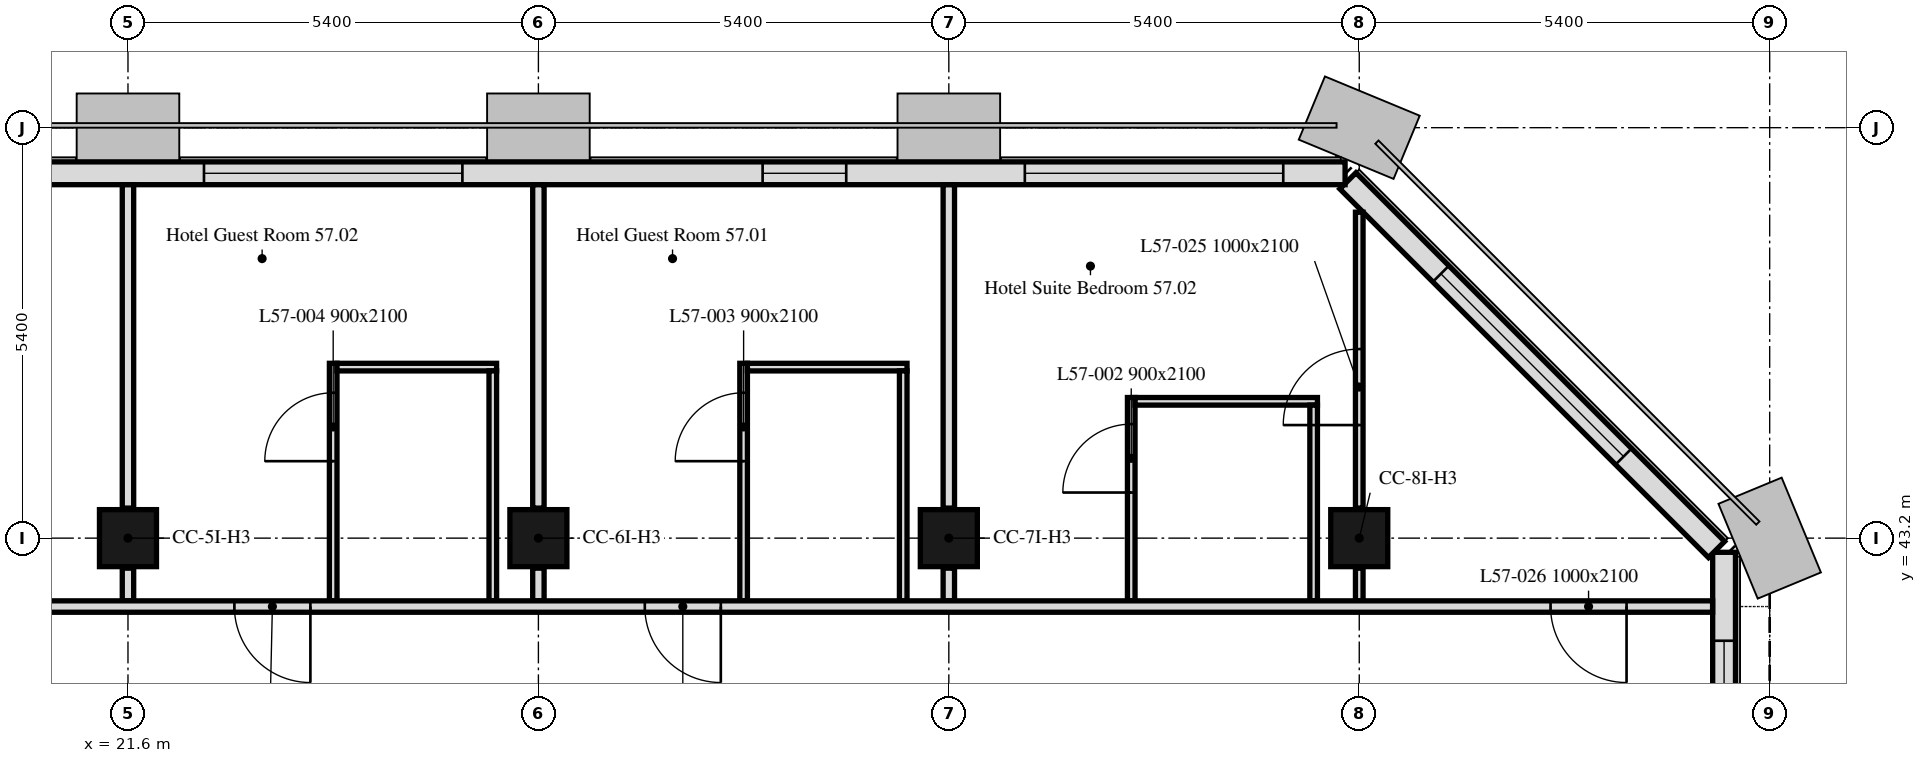
"""IFC4 building model, lengths in metres.
Left out: names, types, materials, properties, quantities, classifications, styles, units other than length and angle.
Written with IfcOpenShell. Run it as: python <this file> out.ifc"""

import sys

from ifc_helpers import new_model, si_unit, direction, frame, frame_2d, origin, origin_2d, place, context, subcontext, project, spatial, rectangle, extrude, element, fill, save


model = new_model("IFC4")
c1 = context("Model", 3, precision=1e-05, world=origin(), true_north=direction((0.0, 1.0)))
c2 = subcontext(c1, "Body", "Model", "MODEL_VIEW")
j1 = project(units=[si_unit("LENGTHUNIT", "METRE"), si_unit("PLANEANGLEUNIT", "RADIAN")], contexts=[c1])
p1 = place(None, origin())
s1 = spatial("IfcSite", under=j1, at=p1, CompositionType="ELEMENT")
p2 = place(p1, origin())
s2 = spatial("IfcBuilding", under=s1, at=p2, CompositionType="ELEMENT")
p3 = place(p2, frame((0.0, 0.0, 226.9)))
s3 = spatial("IfcBuildingStorey", under=s2, at=p3, CompositionType="ELEMENT", Elevation=226.9)
for number, where, z_axis, x_axis in (
    (1, (21.6, 43.2, 0.0), (0.0, 0.0, 1.0), (1.0, 0.0, 0.0)),
    (2, (27.0, 43.2, 0.0), (0.0, 0.0, 1.0), (1.0, 0.0, 0.0)),
    (3, (32.4, 43.2, 0.0), (0.0, 0.0, 1.0), (1.0, 0.0, 0.0)),
    (4, (37.8, 43.2, 0.0), (0.0, 0.0, 1.0), (1.0, 0.0, 0.0)),
):
    element("IfcColumn", number, at=place(p3, frame(where, z_axis=z_axis, x_axis=x_axis)), inside=s3, PredefinedType="COLUMN", context=c2, shape_type="SweptSolid", body=[
        extrude(rectangle(XDim=0.75, YDim=0.75, at=origin_2d()), origin(), (0.0, 0.0, 1.0), 3.0),
    ])
p4 = place(p3, frame((42.6, 32.4, 0.0), z_axis=(0.0, 0.0, 1.0), x_axis=(0.0, 1.0, 0.0)))
e5 = element("IfcWall", 5, at=p4, inside=s3, PredefinedType="SOLIDWALL", context=c2, shape_type="SweptSolid", body=[
    extrude(rectangle(XDim=10.614, YDim=0.3, at=frame_2d((5.307, 0.0))), origin(), (0.0, 0.0, 1.0), 3.0),
])
p5 = place(p4, frame((1.0, 0.0, 0.9)))
e6 = element("IfcOpeningElement", 6, at=p5, cuts=e5, PredefinedType="OPENING", context=c2, shape_type="SweptSolid", body=[
    extrude(rectangle(XDim=3.4, YDim=1.7, at=frame_2d((1.7, 0.85))), frame((0.0, 0.16, 0.0), z_axis=(0.0, -1.0, 0.0), x_axis=(1.0, 0.0, 0.0)), (0.0, 0.0, 1.0), 0.32),
])
p6 = place(p4, frame((6.75, 0.0, 0.9)))
e7 = element("IfcOpeningElement", 7, at=p6, cuts=e5, PredefinedType="OPENING", context=c2, shape_type="SweptSolid", body=[
    extrude(rectangle(XDim=1.1, YDim=1.7, at=frame_2d((0.55, 0.85))), frame((0.0, 0.16, 0.0), z_axis=(0.0, -1.0, 0.0), x_axis=(1.0, 0.0, 0.0)), (0.0, 0.0, 1.0), 0.32),
])
p7 = place(p4, frame((8.35, 0.0, 0.9)))
e8 = element("IfcOpeningElement", 8, at=p7, cuts=e5, PredefinedType="OPENING", context=c2, shape_type="SweptSolid", body=[
    extrude(rectangle(XDim=1.1, YDim=1.7, at=frame_2d((0.55, 0.85))), frame((0.0, 0.16, 0.0), z_axis=(0.0, -1.0, 0.0), x_axis=(1.0, 0.0, 0.0)), (0.0, 0.0, 1.0), 0.32),
])
p8 = place(p3, frame((42.501, 43.051, 0.0), z_axis=(0.0, 0.0, 1.0), x_axis=(-0.707106781187, 0.707106781187, 0.0)))
e9 = element("IfcWall", 9, at=p8, inside=s3, PredefinedType="SOLIDWALL", context=c2, shape_type="SweptSolid", body=[
    extrude(rectangle(XDim=6.86, YDim=0.3, at=frame_2d((3.43, 0.0))), origin(), (0.0, 0.0, 1.0), 3.0),
])
p9 = place(p8, frame((1.73, 0.0, 0.9)))
e10 = element("IfcOpeningElement", 10, at=p9, cuts=e9, PredefinedType="OPENING", context=c2, shape_type="SweptSolid", body=[
    extrude(rectangle(XDim=3.4, YDim=1.7, at=frame_2d((1.7, 0.85))), frame((0.0, 0.16, 0.0), z_axis=(0.0, -1.0, 0.0), x_axis=(1.0, 0.0, 0.0)), (0.0, 0.0, 1.0), 0.32),
])
p10 = place(p3, frame((37.614, 48.0, 0.0), z_axis=(0.0, 0.0, 1.0), x_axis=(-1.0, 0.0, 0.0)))
e11 = element("IfcWall", 11, at=p10, inside=s3, PredefinedType="SOLIDWALL", context=c2, shape_type="SweptSolid", body=[
    extrude(rectangle(XDim=32.027, YDim=0.3, at=frame_2d((16.014, 0.0))), origin(), (0.0, 0.0, 1.0), 3.0),
])
p11 = place(p10, frame((0.814, 0.0, 0.9)))
e12 = element("IfcOpeningElement", 12, at=p11, cuts=e11, PredefinedType="OPENING", context=c2, shape_type="SweptSolid", body=[
    extrude(rectangle(XDim=3.4, YDim=1.7, at=frame_2d((1.7, 0.85))), frame((0.0, 0.16, 0.0), z_axis=(0.0, -1.0, 0.0), x_axis=(1.0, 0.0, 0.0)), (0.0, 0.0, 1.0), 0.32),
])
p12 = place(p10, frame((6.564, 0.0, 0.9)))
e13 = element("IfcOpeningElement", 13, at=p12, cuts=e11, PredefinedType="OPENING", context=c2, shape_type="SweptSolid", body=[
    extrude(rectangle(XDim=1.1, YDim=1.7, at=frame_2d((0.55, 0.85))), frame((0.0, 0.16, 0.0), z_axis=(0.0, -1.0, 0.0), x_axis=(1.0, 0.0, 0.0)), (0.0, 0.0, 1.0), 0.32),
])
p13 = place(p10, frame((11.614, 0.0, 0.9)))
e14 = element("IfcOpeningElement", 14, at=p13, cuts=e11, PredefinedType="OPENING", context=c2, shape_type="SweptSolid", body=[
    extrude(rectangle(XDim=3.4, YDim=1.7, at=frame_2d((1.7, 0.85))), frame((0.0, 0.16, 0.0), z_axis=(0.0, -1.0, 0.0), x_axis=(1.0, 0.0, 0.0)), (0.0, 0.0, 1.0), 0.32),
])
p14 = place(p10, frame((17.364, 0.0, 0.9)))
e15 = element("IfcOpeningElement", 15, at=p14, cuts=e11, PredefinedType="OPENING", context=c2, shape_type="SweptSolid", body=[
    extrude(rectangle(XDim=1.1, YDim=1.7, at=frame_2d((0.55, 0.85))), frame((0.0, 0.16, 0.0), z_axis=(0.0, -1.0, 0.0), x_axis=(1.0, 0.0, 0.0)), (0.0, 0.0, 1.0), 0.32),
])
p15 = place(p10, frame((22.414, 0.0, 0.9)))
e16 = element("IfcOpeningElement", 16, at=p15, cuts=e11, PredefinedType="OPENING", context=c2, shape_type="SweptSolid", body=[
    extrude(rectangle(XDim=3.4, YDim=1.7, at=frame_2d((1.7, 0.85))), frame((0.0, 0.16, 0.0), z_axis=(0.0, -1.0, 0.0), x_axis=(1.0, 0.0, 0.0)), (0.0, 0.0, 1.0), 0.32),
])
p16 = place(p10, frame((28.164, 0.0, 0.9)))
e17 = element("IfcOpeningElement", 17, at=p16, cuts=e11, PredefinedType="OPENING", context=c2, shape_type="SweptSolid", body=[
    extrude(rectangle(XDim=1.1, YDim=1.7, at=frame_2d((0.55, 0.85))), frame((0.0, 0.16, 0.0), z_axis=(0.0, -1.0, 0.0), x_axis=(1.0, 0.0, 0.0)), (0.0, 0.0, 1.0), 0.32),
])
p17 = place(p3, frame((32.4, 47.849, 0.0), z_axis=(0.0, 0.0, 1.0), x_axis=(0.0, -1.0, 0.0)))
e18 = element("IfcWall", 18, at=p17, inside=s3, PredefinedType="PARTITIONING", context=c2, shape_type="SweptSolid", body=[
    extrude(rectangle(XDim=4.254, YDim=0.15, at=frame_2d((2.127, 0.0))), origin(), (0.0, 0.0, 1.0), 2.4),
])
p18 = place(p3, frame((32.4, 42.805, 0.0), z_axis=(0.0, 0.0, 1.0), x_axis=(0.0, -1.0, 0.0)))
e19 = element("IfcWall", 19, at=p18, inside=s3, PredefinedType="PARTITIONING", context=c2, shape_type="SweptSolid", body=[
    extrude(rectangle(XDim=0.43, YDim=0.15, at=frame_2d((0.215, 0.0))), origin(), (0.0, 0.0, 1.0), 2.4),
])
p19 = place(p3, frame((34.8, 42.375, 0.0), z_axis=(0.0, 0.0, 1.0), x_axis=(0.0, 1.0, 0.0)))
e20 = element("IfcWall", 20, at=p19, inside=s3, PredefinedType="PARTITIONING", context=c2, shape_type="SweptSolid", body=[
    extrude(rectangle(XDim=2.675, YDim=0.1, at=frame_2d((1.337, 0.0))), origin(), (0.0, 0.0, 1.0), 3.0),
])
p20 = place(p19, frame((1.425, 0.0, 0.0)))
e21 = element("IfcOpeningElement", 21, at=p20, cuts=e20, PredefinedType="OPENING", context=c2, shape_type="SweptSolid", body=[
    extrude(rectangle(XDim=0.9, YDim=2.1, at=frame_2d((0.45, 1.05))), frame((0.0, 0.05, 0.0), z_axis=(0.0, -1.0, 0.0), x_axis=(1.0, 0.0, 0.0)), (0.0, 0.0, 1.0), 0.1),
])
p21 = place(p3, frame((34.85, 45.0, 0.0), z_axis=(0.0, 0.0, 1.0), x_axis=(1.0, 0.0, 0.0)))
e22 = element("IfcWall", 22, at=p21, inside=s3, PredefinedType="PARTITIONING", context=c2, shape_type="SweptSolid", body=[
    extrude(rectangle(XDim=2.4, YDim=0.1, at=frame_2d((1.2, 0.0))), origin(), (0.0, 0.0, 1.0), 3.0),
])
p22 = place(p3, frame((37.2, 44.95, 0.0), z_axis=(0.0, 0.0, 1.0), x_axis=(0.0, -1.0, 0.0)))
e23 = element("IfcWall", 23, at=p22, inside=s3, PredefinedType="PARTITIONING", context=c2, shape_type="SweptSolid", body=[
    extrude(rectangle(XDim=2.575, YDim=0.1, at=frame_2d((1.288, 0.0))), origin(), (0.0, 0.0, 1.0), 3.0),
])
p23 = place(p3, frame((37.8, 42.375, 0.0), z_axis=(0.0, 0.0, 1.0), x_axis=(0.0, 1.0, 0.0)))
e24 = element("IfcWall", 24, at=p23, inside=s3, PredefinedType="PARTITIONING", context=c2, shape_type="SweptSolid", body=[
    extrude(rectangle(XDim=0.43, YDim=0.1, at=frame_2d((0.215, 0.0))), origin(), (0.0, 0.0, 1.0), 3.0),
])
p24 = place(p3, frame((37.8, 43.595, 0.0), z_axis=(0.0, 0.0, 1.0), x_axis=(0.0, 1.0, 0.0)))
e25 = element("IfcWall", 25, at=p24, inside=s3, PredefinedType="PARTITIONING", context=c2, shape_type="SweptSolid", body=[
    extrude(rectangle(XDim=3.893, YDim=0.1, at=frame_2d((1.946, 0.0))), origin(), (0.0, 0.0, 1.0), 3.0),
])
p25 = place(p24, frame((1.093, 0.0, 0.0)))
e26 = element("IfcOpeningElement", 26, at=p25, cuts=e25, PredefinedType="OPENING", context=c2, shape_type="SweptSolid", body=[
    extrude(rectangle(XDim=1.0, YDim=2.1, at=frame_2d((0.5, 1.05))), frame((0.0, 0.05, 0.0), z_axis=(0.0, -1.0, 0.0), x_axis=(1.0, 0.0, 0.0)), (0.0, 0.0, 1.0), 0.1),
])
p26 = place(p3, frame((27.0, 47.849, 0.0), z_axis=(0.0, 0.0, 1.0), x_axis=(0.0, -1.0, 0.0)))
e27 = element("IfcWall", 27, at=p26, inside=s3, PredefinedType="PARTITIONING", context=c2, shape_type="SweptSolid", body=[
    extrude(rectangle(XDim=4.254, YDim=0.15, at=frame_2d((2.127, 0.0))), origin(), (0.0, 0.0, 1.0), 2.4),
])
p27 = place(p3, frame((27.0, 42.805, 0.0), z_axis=(0.0, 0.0, 1.0), x_axis=(0.0, -1.0, 0.0)))
e28 = element("IfcWall", 28, at=p27, inside=s3, PredefinedType="PARTITIONING", context=c2, shape_type="SweptSolid", body=[
    extrude(rectangle(XDim=0.43, YDim=0.15, at=frame_2d((0.215, 0.0))), origin(), (0.0, 0.0, 1.0), 2.4),
])
p28 = place(p3, frame((29.7, 42.375, 0.0), z_axis=(0.0, 0.0, 1.0), x_axis=(0.0, 1.0, 0.0)))
e29 = element("IfcWall", 29, at=p28, inside=s3, PredefinedType="PARTITIONING", context=c2, shape_type="SweptSolid", body=[
    extrude(rectangle(XDim=3.125, YDim=0.1, at=frame_2d((1.562, 0.0))), origin(), (0.0, 0.0, 1.0), 3.0),
])
p29 = place(p28, frame((1.837, 0.0, 0.0)))
e30 = element("IfcOpeningElement", 30, at=p29, cuts=e29, PredefinedType="OPENING", context=c2, shape_type="SweptSolid", body=[
    extrude(rectangle(XDim=0.9, YDim=2.1, at=frame_2d((0.45, 1.05))), frame((0.0, 0.05, 0.0), z_axis=(0.0, -1.0, 0.0), x_axis=(1.0, 0.0, 0.0)), (0.0, 0.0, 1.0), 0.1),
])
p30 = place(p3, frame((29.75, 45.45, 0.0), z_axis=(0.0, 0.0, 1.0), x_axis=(1.0, 0.0, 0.0)))
e31 = element("IfcWall", 31, at=p30, inside=s3, PredefinedType="PARTITIONING", context=c2, shape_type="SweptSolid", body=[
    extrude(rectangle(XDim=2.1, YDim=0.1, at=frame_2d((1.05, 0.0))), origin(), (0.0, 0.0, 1.0), 3.0),
])
p31 = place(p3, frame((31.8, 45.4, 0.0), z_axis=(0.0, 0.0, 1.0), x_axis=(0.0, -1.0, 0.0)))
e32 = element("IfcWall", 32, at=p31, inside=s3, PredefinedType="PARTITIONING", context=c2, shape_type="SweptSolid", body=[
    extrude(rectangle(XDim=3.025, YDim=0.1, at=frame_2d((1.512, 0.0))), origin(), (0.0, 0.0, 1.0), 3.0),
])
p32 = place(p3, frame((21.6, 47.849, 0.0), z_axis=(0.0, 0.0, 1.0), x_axis=(0.0, -1.0, 0.0)))
e33 = element("IfcWall", 33, at=p32, inside=s3, PredefinedType="PARTITIONING", context=c2, shape_type="SweptSolid", body=[
    extrude(rectangle(XDim=4.254, YDim=0.15, at=frame_2d((2.127, 0.0))), origin(), (0.0, 0.0, 1.0), 2.4),
])
p33 = place(p3, frame((21.6, 42.805, 0.0), z_axis=(0.0, 0.0, 1.0), x_axis=(0.0, -1.0, 0.0)))
e34 = element("IfcWall", 34, at=p33, inside=s3, PredefinedType="PARTITIONING", context=c2, shape_type="SweptSolid", body=[
    extrude(rectangle(XDim=0.43, YDim=0.15, at=frame_2d((0.215, 0.0))), origin(), (0.0, 0.0, 1.0), 2.4),
])
p34 = place(p3, frame((24.3, 42.375, 0.0), z_axis=(0.0, 0.0, 1.0), x_axis=(0.0, 1.0, 0.0)))
e35 = element("IfcWall", 35, at=p34, inside=s3, PredefinedType="PARTITIONING", context=c2, shape_type="SweptSolid", body=[
    extrude(rectangle(XDim=3.125, YDim=0.1, at=frame_2d((1.562, 0.0))), origin(), (0.0, 0.0, 1.0), 3.0),
])
p35 = place(p34, frame((1.837, 0.0, 0.0)))
e36 = element("IfcOpeningElement", 36, at=p35, cuts=e35, PredefinedType="OPENING", context=c2, shape_type="SweptSolid", body=[
    extrude(rectangle(XDim=0.9, YDim=2.1, at=frame_2d((0.45, 1.05))), frame((0.0, 0.05, 0.0), z_axis=(0.0, -1.0, 0.0), x_axis=(1.0, 0.0, 0.0)), (0.0, 0.0, 1.0), 0.1),
])
p36 = place(p3, frame((24.35, 45.45, 0.0), z_axis=(0.0, 0.0, 1.0), x_axis=(1.0, 0.0, 0.0)))
e37 = element("IfcWall", 37, at=p36, inside=s3, PredefinedType="PARTITIONING", context=c2, shape_type="SweptSolid", body=[
    extrude(rectangle(XDim=2.1, YDim=0.1, at=frame_2d((1.05, 0.0))), origin(), (0.0, 0.0, 1.0), 3.0),
])
p37 = place(p3, frame((26.4, 45.4, 0.0), z_axis=(0.0, 0.0, 1.0), x_axis=(0.0, -1.0, 0.0)))
e38 = element("IfcWall", 38, at=p37, inside=s3, PredefinedType="PARTITIONING", context=c2, shape_type="SweptSolid", body=[
    extrude(rectangle(XDim=3.025, YDim=0.1, at=frame_2d((1.512, 0.0))), origin(), (0.0, 0.0, 1.0), 3.0),
])
p38 = place(p3, frame((42.449, 42.3, 0.0), z_axis=(0.0, 0.0, 1.0), x_axis=(-1.0, 0.0, 0.0)))
e39 = element("IfcWall", 39, at=p38, inside=s3, PredefinedType="PARTITIONING", context=c2, shape_type="SweptSolid", body=[
    extrude(rectangle(XDim=41.698, YDim=0.15, at=frame_2d((20.849, 0.0))), origin(), (0.0, 0.0, 1.0), 2.4),
])
p39 = place(p38, frame((1.132, 0.0, 0.0)))
e40 = element("IfcOpeningElement", 40, at=p39, cuts=e39, PredefinedType="OPENING", context=c2, shape_type="SweptSolid", body=[
    extrude(rectangle(XDim=1.0, YDim=2.1, at=frame_2d((0.5, 1.05))), frame((0.0, 0.075, 0.0), z_axis=(0.0, -1.0, 0.0), x_axis=(1.0, 0.0, 0.0)), (0.0, 0.0, 1.0), 0.15),
])
p40 = place(p38, frame((13.049, 0.0, 0.0)))
e41 = element("IfcOpeningElement", 41, at=p40, cuts=e39, PredefinedType="OPENING", context=c2, shape_type="SweptSolid", body=[
    extrude(rectangle(XDim=1.0, YDim=2.1, at=frame_2d((0.5, 1.05))), frame((0.0, 0.075, 0.0), z_axis=(0.0, -1.0, 0.0), x_axis=(1.0, 0.0, 0.0)), (0.0, 0.0, 1.0), 0.15),
])
p41 = place(p38, frame((18.449, 0.0, 0.0)))
e42 = element("IfcOpeningElement", 42, at=p41, cuts=e39, PredefinedType="OPENING", context=c2, shape_type="SweptSolid", body=[
    extrude(rectangle(XDim=1.0, YDim=2.1, at=frame_2d((0.5, 1.05))), frame((0.0, 0.075, 0.0), z_axis=(0.0, -1.0, 0.0), x_axis=(1.0, 0.0, 0.0)), (0.0, 0.0, 1.0), 0.15),
])
p42 = place(p38, frame((23.049, 0.0, 0.0)))
e43 = element("IfcOpeningElement", 43, at=p42, cuts=e39, PredefinedType="OPENING", context=c2, shape_type="SweptSolid", body=[
    extrude(rectangle(XDim=1.0, YDim=2.1, at=frame_2d((0.5, 1.05))), frame((0.0, 0.075, 0.0), z_axis=(0.0, -1.0, 0.0), x_axis=(1.0, 0.0, 0.0)), (0.0, 0.0, 1.0), 0.15),
])
p43 = place(p38, frame((37.599, 0.0, 0.0)))
e44 = element("IfcOpeningElement", 44, at=p43, cuts=e39, PredefinedType="OPENING", context=c2, shape_type="SweptSolid", body=[
    extrude(rectangle(XDim=1.0, YDim=2.1, at=frame_2d((0.5, 1.05))), frame((0.0, 0.075, 0.0), z_axis=(0.0, -1.0, 0.0), x_axis=(1.0, 0.0, 0.0)), (0.0, 0.0, 1.0), 0.15),
])
p44 = place(p7, origin())
e45 = element("IfcWindow", 45, at=p44, inside=s3, PartitioningType="SINGLE_PANEL", PredefinedType="WINDOW", context=c2, shape_type="SweptSolid", body=[
    extrude(rectangle(XDim=1.1, YDim=1.7, at=frame_2d((0.55, 0.85))), frame((0.0, 0.03, 0.0), z_axis=(0.0, -1.0, 0.0), x_axis=(1.0, 0.0, 0.0)), (0.0, 0.0, 1.0), 0.06),
])
fill(e8, e45)
p45 = place(p9, origin())
e46 = element("IfcWindow", 46, at=p45, inside=s3, PartitioningType="SINGLE_PANEL", PredefinedType="WINDOW", context=c2, shape_type="SweptSolid", body=[
    extrude(rectangle(XDim=3.4, YDim=1.7, at=frame_2d((1.7, 0.85))), frame((0.0, 0.03, 0.0), z_axis=(0.0, -1.0, 0.0), x_axis=(1.0, 0.0, 0.0)), (0.0, 0.0, 1.0), 0.06),
])
fill(e10, e46)
p46 = place(p11, origin())
e47 = element("IfcWindow", 47, at=p46, inside=s3, PartitioningType="SINGLE_PANEL", PredefinedType="WINDOW", context=c2, shape_type="SweptSolid", body=[
    extrude(rectangle(XDim=3.4, YDim=1.7, at=frame_2d((1.7, 0.85))), frame((0.0, 0.03, 0.0), z_axis=(0.0, -1.0, 0.0), x_axis=(1.0, 0.0, 0.0)), (0.0, 0.0, 1.0), 0.06),
])
fill(e12, e47)
p47 = place(p12, origin())
e48 = element("IfcWindow", 48, at=p47, inside=s3, PartitioningType="SINGLE_PANEL", PredefinedType="WINDOW", context=c2, shape_type="SweptSolid", body=[
    extrude(rectangle(XDim=1.1, YDim=1.7, at=frame_2d((0.55, 0.85))), frame((0.0, 0.03, 0.0), z_axis=(0.0, -1.0, 0.0), x_axis=(1.0, 0.0, 0.0)), (0.0, 0.0, 1.0), 0.06),
])
fill(e13, e48)
p48 = place(p13, origin())
e49 = element("IfcWindow", 49, at=p48, inside=s3, PartitioningType="SINGLE_PANEL", PredefinedType="WINDOW", context=c2, shape_type="SweptSolid", body=[
    extrude(rectangle(XDim=3.4, YDim=1.7, at=frame_2d((1.7, 0.85))), frame((0.0, 0.03, 0.0), z_axis=(0.0, -1.0, 0.0), x_axis=(1.0, 0.0, 0.0)), (0.0, 0.0, 1.0), 0.06),
])
fill(e14, e49)
p49 = place(p20, origin())
e50 = element("IfcDoor", 50, at=p49, inside=s3, OperationType="SINGLE_SWING_LEFT", PredefinedType="DOOR", context=c2, shape_type="SweptSolid", body=[
    extrude(rectangle(XDim=0.9, YDim=2.1, at=frame_2d((0.45, 1.05))), frame((0.0, 0.025, 0.0), z_axis=(0.0, -1.0, 0.0), x_axis=(1.0, 0.0, 0.0)), (0.0, 0.0, 1.0), 0.05),
])
fill(e21, e50)
p50 = place(p29, origin())
e51 = element("IfcDoor", 51, at=p50, inside=s3, OperationType="SINGLE_SWING_LEFT", PredefinedType="DOOR", context=c2, shape_type="SweptSolid", body=[
    extrude(rectangle(XDim=0.9, YDim=2.1, at=frame_2d((0.45, 1.05))), frame((0.0, 0.025, 0.0), z_axis=(0.0, -1.0, 0.0), x_axis=(1.0, 0.0, 0.0)), (0.0, 0.0, 1.0), 0.05),
])
fill(e30, e51)
p51 = place(p35, origin())
e52 = element("IfcDoor", 52, at=p51, inside=s3, OperationType="SINGLE_SWING_RIGHT", PredefinedType="DOOR", context=c2, shape_type="SweptSolid", body=[
    extrude(rectangle(XDim=0.9, YDim=2.1, at=frame_2d((0.45, 1.05))), frame((0.0, 0.025, 0.0), z_axis=(0.0, -1.0, 0.0), x_axis=(1.0, 0.0, 0.0)), (0.0, 0.0, 1.0), 0.05),
])
fill(e36, e52)
p52 = place(p25, origin())
e53 = element("IfcDoor", 53, at=p52, inside=s3, OperationType="SINGLE_SWING_LEFT", PredefinedType="DOOR", context=c2, shape_type="SweptSolid", body=[
    extrude(rectangle(XDim=1.0, YDim=2.1, at=frame_2d((0.5, 1.05))), frame((0.0, 0.025, 0.0), z_axis=(0.0, -1.0, 0.0), x_axis=(1.0, 0.0, 0.0)), (0.0, 0.0, 1.0), 0.05),
])
fill(e26, e53)
p53 = place(p39, origin())
e54 = element("IfcDoor", 54, at=p53, inside=s3, OperationType="SINGLE_SWING_RIGHT", PredefinedType="DOOR", context=c2, shape_type="SweptSolid", body=[
    extrude(rectangle(XDim=1.0, YDim=2.1, at=frame_2d((0.5, 1.05))), frame((0.0, 0.025, 0.0), z_axis=(0.0, -1.0, 0.0), x_axis=(1.0, 0.0, 0.0)), (0.0, 0.0, 1.0), 0.05),
])
fill(e40, e54)
p54 = place(p40, origin())
e55 = element("IfcDoor", 55, at=p54, inside=s3, OperationType="SINGLE_SWING_RIGHT", PredefinedType="DOOR", context=c2, shape_type="SweptSolid", body=[
    extrude(rectangle(XDim=1.0, YDim=2.1, at=frame_2d((0.5, 1.05))), frame((0.0, 0.025, 0.0), z_axis=(0.0, -1.0, 0.0), x_axis=(1.0, 0.0, 0.0)), (0.0, 0.0, 1.0), 0.05),
])
fill(e41, e55)
p55 = place(p41, origin())
e56 = element("IfcDoor", 56, at=p55, inside=s3, OperationType="SINGLE_SWING_RIGHT", PredefinedType="DOOR", context=c2, shape_type="SweptSolid", body=[
    extrude(rectangle(XDim=1.0, YDim=2.1, at=frame_2d((0.5, 1.05))), frame((0.0, 0.025, 0.0), z_axis=(0.0, -1.0, 0.0), x_axis=(1.0, 0.0, 0.0)), (0.0, 0.0, 1.0), 0.05),
])
fill(e42, e56)
save(model, sys.argv[1])
